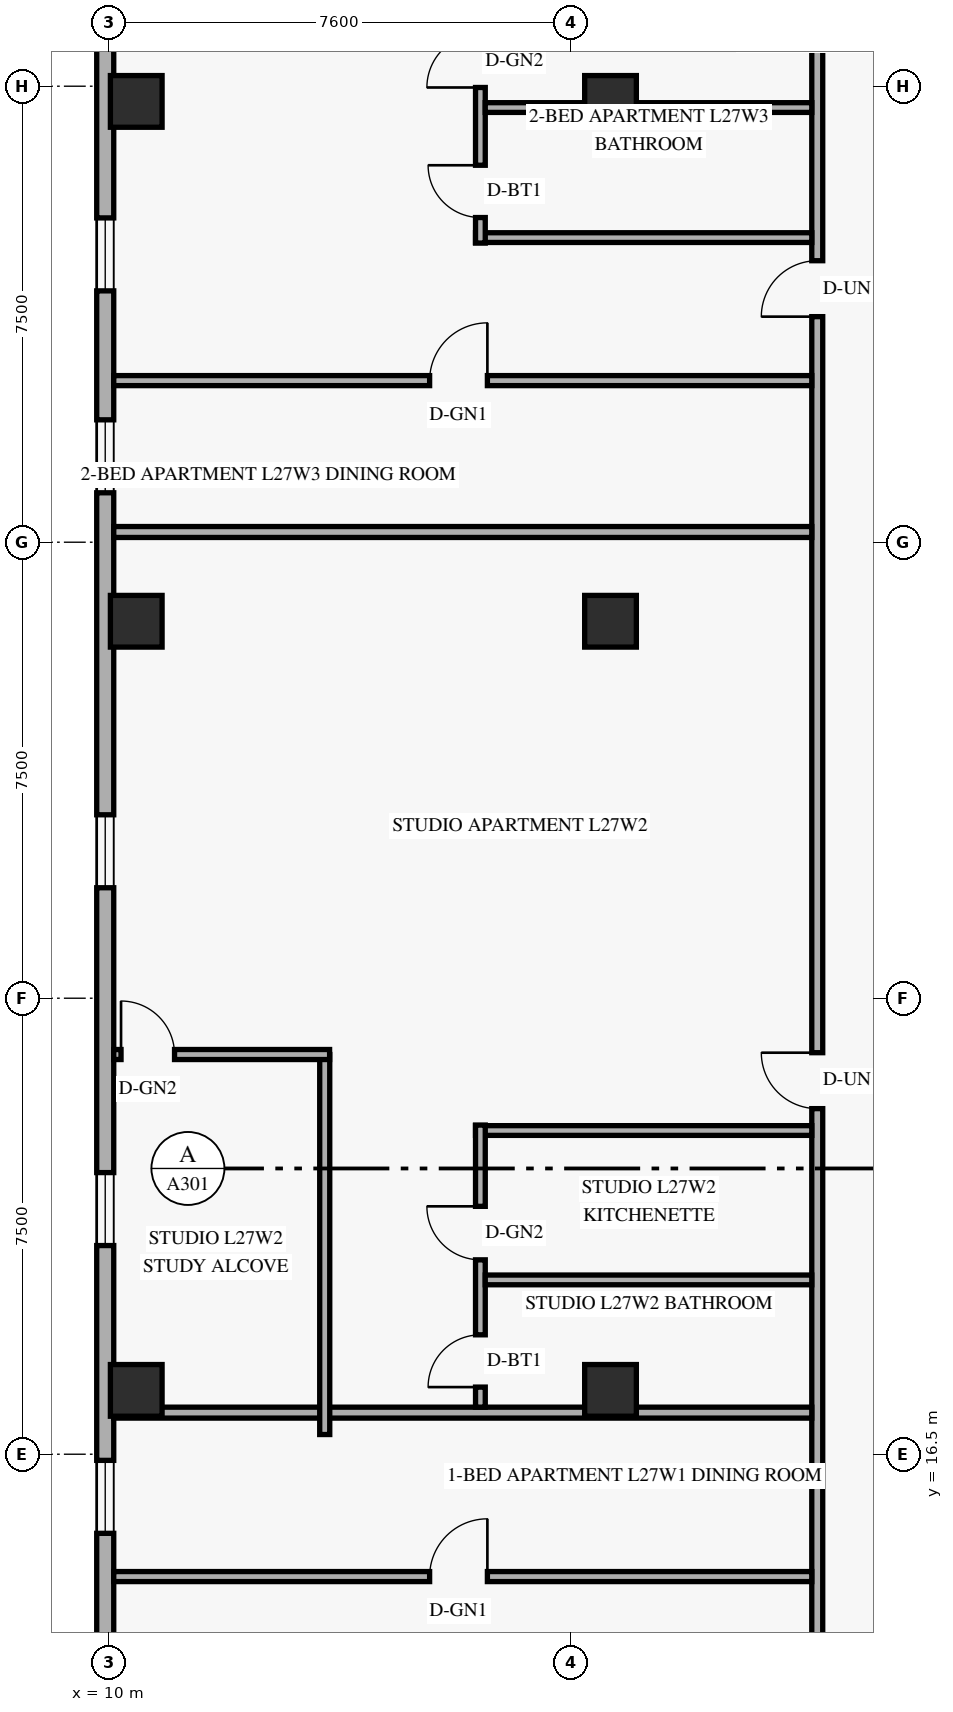
"""IFC4 building model, lengths in metres.
Left out: names, types, materials, properties, quantities, classifications, styles, units other than length and angle.
Written with IfcOpenShell. Run it as: python <this file> out.ifc"""

import sys

from ifc_helpers import new_model, si_unit, direction, frame, frame_2d, origin, origin_2d, place, context, subcontext, project, spatial, rectangle, extrude, element, fill, save


model = new_model("IFC4")
c1 = context("Model", 3, precision=1e-05, world=origin(), true_north=direction((0.0, 1.0)))
c2 = subcontext(c1, "Body", "Model", "MODEL_VIEW")
j1 = project(units=[si_unit("LENGTHUNIT", "METRE"), si_unit("PLANEANGLEUNIT", "RADIAN")], contexts=[c1])
p1 = place(None, origin())
s1 = spatial("IfcSite", under=j1, at=p1, CompositionType="ELEMENT")
p2 = place(p1, origin())
s2 = spatial("IfcBuilding", under=s1, at=p2, CompositionType="ELEMENT")
p3 = place(p2, frame((0.0, 0.0, 106.2)))
s3 = spatial("IfcBuildingStorey", under=s2, at=p3, CompositionType="ELEMENT", Elevation=106.2)
for number, where, z_axis, x_axis in (
    (1, (10.45, 17.55, 0.0), (0.0, 0.0, 1.0), (1.0, 0.0, 0.0)),
    (2, (10.45, 30.2, 0.0), (0.0, 0.0, 1.0), (1.0, 0.0, 0.0)),
    (3, (10.45, 38.75, 0.0), (0.0, 0.0, 1.0), (1.0, 0.0, 0.0)),
    (4, (18.25, 17.55, 0.0), (0.0, 0.0, 1.0), (1.0, 0.0, 0.0)),
    (5, (18.25, 30.2, 0.0), (0.0, 0.0, 1.0), (1.0, 0.0, 0.0)),
    (6, (18.25, 38.75, 0.0), (0.0, 0.0, 1.0), (1.0, 0.0, 0.0)),
):
    element("IfcColumn", number, at=place(p3, frame(where, z_axis=z_axis, x_axis=x_axis)), inside=s3, PredefinedType="COLUMN", context=c2, shape_type="SweptSolid", body=[
        extrude(rectangle(XDim=0.85, YDim=0.85, at=origin_2d()), origin(), (0.0, 0.0, 1.0), 3.6),
    ])
p4 = place(p3, frame((9.94, 41.68, 0.0), z_axis=(0.0, 0.0, 1.0), x_axis=(0.0, -1.0, 0.0)))
e7 = element("IfcWall", 7, at=p4, inside=s3, PredefinedType="SOLIDWALL", context=c2, shape_type="SweptSolid", body=[
    extrude(rectangle(XDim=35.36, YDim=0.28, at=frame_2d((17.68, 0.0))), origin(), (0.0, 0.0, 1.0), 3.36),
])
p5 = place(p4, frame((28.991, 0.0, 0.85)))
e8 = element("IfcOpeningElement", 8, at=p5, cuts=e7, PredefinedType="OPENING", context=c2, shape_type="SweptSolid", body=[
    extrude(rectangle(XDim=1.2, YDim=1.5, at=frame_2d((0.6, 0.75))), frame((0.0, 0.15, 0.0), z_axis=(0.0, -1.0, 0.0), x_axis=(1.0, 0.0, 0.0)), (0.0, 0.0, 1.0), 0.3),
])
p6 = place(p4, frame((25.281, 0.0, 0.85)))
e9 = element("IfcOpeningElement", 9, at=p6, cuts=e7, PredefinedType="OPENING", context=c2, shape_type="SweptSolid", body=[
    extrude(rectangle(XDim=1.2, YDim=1.5, at=frame_2d((0.6, 0.75))), frame((0.0, 0.15, 0.0), z_axis=(0.0, -1.0, 0.0), x_axis=(1.0, 0.0, 0.0)), (0.0, 0.0, 1.0), 0.3),
])
p7 = place(p4, frame((20.548, 0.0, 0.85)))
e10 = element("IfcOpeningElement", 10, at=p7, cuts=e7, PredefinedType="OPENING", context=c2, shape_type="SweptSolid", body=[
    extrude(rectangle(XDim=1.2, YDim=1.5, at=frame_2d((0.6, 0.75))), frame((0.0, 0.15, 0.0), z_axis=(0.0, -1.0, 0.0), x_axis=(1.0, 0.0, 0.0)), (0.0, 0.0, 1.0), 0.3),
])
p8 = place(p4, frame((14.663, 0.0, 0.85)))
e11 = element("IfcOpeningElement", 11, at=p8, cuts=e7, PredefinedType="OPENING", context=c2, shape_type="SweptSolid", body=[
    extrude(rectangle(XDim=1.2, YDim=1.5, at=frame_2d((0.6, 0.75))), frame((0.0, 0.15, 0.0), z_axis=(0.0, -1.0, 0.0), x_axis=(1.0, 0.0, 0.0)), (0.0, 0.0, 1.0), 0.3),
])
p9 = place(p4, frame((8.167, 0.0, 0.85)))
e12 = element("IfcOpeningElement", 12, at=p9, cuts=e7, PredefinedType="OPENING", context=c2, shape_type="SweptSolid", body=[
    extrude(rectangle(XDim=1.2, YDim=1.5, at=frame_2d((0.6, 0.75))), frame((0.0, 0.15, 0.0), z_axis=(0.0, -1.0, 0.0), x_axis=(1.0, 0.0, 0.0)), (0.0, 0.0, 1.0), 0.3),
])
p10 = place(p4, frame((4.846, 0.0, 0.85)))
e13 = element("IfcOpeningElement", 13, at=p10, cuts=e7, PredefinedType="OPENING", context=c2, shape_type="SweptSolid", body=[
    extrude(rectangle(XDim=1.2, YDim=1.5, at=frame_2d((0.6, 0.75))), frame((0.0, 0.15, 0.0), z_axis=(0.0, -1.0, 0.0), x_axis=(1.0, 0.0, 0.0)), (0.0, 0.0, 1.0), 0.3),
])
p11 = place(p3, frame((21.65, 6.8, 0.0), z_axis=(0.0, 0.0, 1.0), x_axis=(0.0, 1.0, 0.0)))
e14 = element("IfcWall", 14, at=p11, inside=s3, PredefinedType="STANDARD", context=c2, shape_type="SweptSolid", body=[
    extrude(rectangle(XDim=34.4, YDim=0.18, at=frame_2d((17.2, 0.0))), origin(), (0.0, 0.0, 1.0), 2.731),
])
p12 = place(p11, frame((4.785, 0.0, 0.0)))
e15 = element("IfcOpeningElement", 15, at=p12, cuts=e14, PredefinedType="OPENING", context=c2, shape_type="SweptSolid", body=[
    extrude(rectangle(XDim=0.92, YDim=2.15, at=frame_2d((0.46, 1.075))), frame((0.0, 0.1, 0.0), z_axis=(0.0, -1.0, 0.0), x_axis=(1.0, 0.0, 0.0)), (0.0, 0.0, 1.0), 0.2),
])
p13 = place(p11, frame((15.384, 0.0, 0.0)))
e16 = element("IfcOpeningElement", 16, at=p13, cuts=e14, PredefinedType="OPENING", context=c2, shape_type="SweptSolid", body=[
    extrude(rectangle(XDim=0.92, YDim=2.15, at=frame_2d((0.46, 1.075))), frame((0.0, 0.1, 0.0), z_axis=(0.0, -1.0, 0.0), x_axis=(1.0, 0.0, 0.0)), (0.0, 0.0, 1.0), 0.2),
])
p14 = place(p11, frame((28.41, 0.0, 0.0)))
e17 = element("IfcOpeningElement", 17, at=p14, cuts=e14, PredefinedType="OPENING", context=c2, shape_type="SweptSolid", body=[
    extrude(rectangle(XDim=0.92, YDim=2.15, at=frame_2d((0.46, 1.075))), frame((0.0, 0.1, 0.0), z_axis=(0.0, -1.0, 0.0), x_axis=(1.0, 0.0, 0.0)), (0.0, 0.0, 1.0), 0.2),
])
p15 = place(p3, frame((10.08, 14.488, 0.0), z_axis=(0.0, 0.0, 1.0), x_axis=(1.0, 0.0, 0.0)))
e18 = element("IfcWall", 18, at=p15, inside=s3, PredefinedType="PARTITIONING", context=c2, shape_type="SweptSolid", body=[
    extrude(rectangle(XDim=11.48, YDim=0.165, at=frame_2d((5.74, 0.0))), origin(), (0.0, 0.0, 1.0), 2.731),
])
p16 = place(p15, frame((5.195, 0.0, 0.0)))
e19 = element("IfcOpeningElement", 19, at=p16, cuts=e18, PredefinedType="OPENING", context=c2, shape_type="SweptSolid", body=[
    extrude(rectangle(XDim=0.95, YDim=2.15, at=frame_2d((0.475, 1.075))), frame((0.0, 0.093, 0.0), z_axis=(0.0, -1.0, 0.0), x_axis=(1.0, 0.0, 0.0)), (0.0, 0.0, 1.0), 0.185),
])
p17 = place(p3, frame((10.08, 17.184, 0.0), z_axis=(0.0, 0.0, 1.0), x_axis=(1.0, 0.0, 0.0)))
e20 = element("IfcWall", 20, at=p17, inside=s3, PredefinedType="PARTITIONING", context=c2, shape_type="SweptSolid", body=[
    extrude(rectangle(XDim=11.48, YDim=0.18, at=frame_2d((5.74, 0.0))), origin(), (0.0, 0.0, 1.0), 2.731),
])
p18 = place(p3, frame((16.03, 21.824, 0.0), z_axis=(0.0, 0.0, 1.0), x_axis=(1.0, 0.0, 0.0)))
e21 = element("IfcWall", 21, at=p18, inside=s3, PredefinedType="PLUMBINGWALL", context=c2, shape_type="SweptSolid", body=[
    extrude(rectangle(XDim=5.53, YDim=0.16, at=frame_2d((2.765, 0.0))), origin(), (0.0, 0.0, 1.0), 2.731),
])
p19 = place(p3, frame((16.11, 17.274, 0.0), z_axis=(0.0, 0.0, 1.0), x_axis=(0.0, 1.0, 0.0)))
e22 = element("IfcWall", 22, at=p19, inside=s3, PredefinedType="PLUMBINGWALL", context=c2, shape_type="SweptSolid", body=[
    extrude(rectangle(XDim=4.64, YDim=0.16, at=frame_2d((2.32, 0.0))), origin(), (0.0, 0.0, 1.0), 2.731),
])
p20 = place(p19, frame((0.33, 0.0, 0.0)))
e23 = element("IfcOpeningElement", 23, at=p20, cuts=e22, PredefinedType="OPENING", context=c2, shape_type="SweptSolid", body=[
    extrude(rectangle(XDim=0.86, YDim=2.12, at=frame_2d((0.43, 1.06))), frame((0.0, 0.09, 0.0), z_axis=(0.0, -1.0, 0.0), x_axis=(1.0, 0.0, 0.0)), (0.0, 0.0, 1.0), 0.18),
])
p21 = place(p19, frame((2.423, 0.0, 0.0)))
e24 = element("IfcOpeningElement", 24, at=p21, cuts=e22, PredefinedType="OPENING", context=c2, shape_type="SweptSolid", body=[
    extrude(rectangle(XDim=0.88, YDim=2.12, at=frame_2d((0.44, 1.06))), frame((0.0, 0.09, 0.0), z_axis=(0.0, -1.0, 0.0), x_axis=(1.0, 0.0, 0.0)), (0.0, 0.0, 1.0), 0.18),
])
p22 = place(p3, frame((16.19, 19.367, 0.0), z_axis=(0.0, 0.0, 1.0), x_axis=(1.0, 0.0, 0.0)))
e25 = element("IfcWall", 25, at=p22, inside=s3, PredefinedType="PLUMBINGWALL", context=c2, shape_type="SweptSolid", body=[
    extrude(rectangle(XDim=5.37, YDim=0.16, at=frame_2d((2.685, 0.0))), origin(), (0.0, 0.0, 1.0), 2.731),
])
p23 = place(p3, frame((13.55, 16.824, 0.0), z_axis=(0.0, 0.0, 1.0), x_axis=(0.0, 1.0, 0.0)))
e26 = element("IfcWall", 26, at=p23, inside=s3, PredefinedType="PARTITIONING", context=c2, shape_type="SweptSolid", body=[
    extrude(rectangle(XDim=6.25, YDim=0.165, at=frame_2d((3.125, 0.0))), origin(), (0.0, 0.0, 1.0), 2.731),
])
p24 = place(p3, frame((10.08, 23.074, 0.0), z_axis=(0.0, 0.0, 1.0), x_axis=(1.0, 0.0, 0.0)))
e27 = element("IfcWall", 27, at=p24, inside=s3, PredefinedType="PARTITIONING", context=c2, shape_type="SweptSolid", body=[
    extrude(rectangle(XDim=3.55, YDim=0.165, at=frame_2d((1.775, 0.0))), origin(), (0.0, 0.0, 1.0), 2.809),
])
p25 = place(p24, frame((0.12, 0.0, 0.0)))
e28 = element("IfcOpeningElement", 28, at=p25, cuts=e27, PredefinedType="OPENING", context=c2, shape_type="SweptSolid", body=[
    extrude(rectangle(XDim=0.88, YDim=2.12, at=frame_2d((0.44, 1.06))), frame((0.0, 0.093, 0.0), z_axis=(0.0, -1.0, 0.0), x_axis=(1.0, 0.0, 0.0)), (0.0, 0.0, 1.0), 0.185),
])
p26 = place(p3, frame((10.08, 31.668, 0.0), z_axis=(0.0, 0.0, 1.0), x_axis=(1.0, 0.0, 0.0)))
e29 = element("IfcWall", 29, at=p26, inside=s3, PredefinedType="PARTITIONING", context=c2, shape_type="SweptSolid", body=[
    extrude(rectangle(XDim=11.48, YDim=0.18, at=frame_2d((5.74, 0.0))), origin(), (0.0, 0.0, 1.0), 2.731),
])
p27 = place(p3, frame((16.03, 36.51, 0.0), z_axis=(0.0, 0.0, 1.0), x_axis=(1.0, 0.0, 0.0)))
e30 = element("IfcWall", 30, at=p27, inside=s3, PredefinedType="PLUMBINGWALL", context=c2, shape_type="SweptSolid", body=[
    extrude(rectangle(XDim=5.53, YDim=0.16, at=frame_2d((2.765, 0.0))), origin(), (0.0, 0.0, 1.0), 2.731),
])
p28 = place(p3, frame((16.11, 36.42, 0.0), z_axis=(0.0, 0.0, 1.0), x_axis=(0.0, 1.0, 0.0)))
e31 = element("IfcWall", 31, at=p28, inside=s3, PredefinedType="PLUMBINGWALL", context=c2, shape_type="SweptSolid", body=[
    extrude(rectangle(XDim=4.83, YDim=0.16, at=frame_2d((2.415, 0.0))), origin(), (0.0, 0.0, 1.0), 2.731),
])
p29 = place(p28, frame((0.42, 0.0, 0.0)))
e32 = element("IfcOpeningElement", 32, at=p29, cuts=e31, PredefinedType="OPENING", context=c2, shape_type="SweptSolid", body=[
    extrude(rectangle(XDim=0.86, YDim=2.12, at=frame_2d((0.43, 1.06))), frame((0.0, 0.09, 0.0), z_axis=(0.0, -1.0, 0.0), x_axis=(1.0, 0.0, 0.0)), (0.0, 0.0, 1.0), 0.18),
])
p30 = place(p28, frame((2.559, 0.0, 0.0)))
e33 = element("IfcOpeningElement", 33, at=p30, cuts=e31, PredefinedType="OPENING", context=c2, shape_type="SweptSolid", body=[
    extrude(rectangle(XDim=0.88, YDim=2.12, at=frame_2d((0.44, 1.06))), frame((0.0, 0.09, 0.0), z_axis=(0.0, -1.0, 0.0), x_axis=(1.0, 0.0, 0.0)), (0.0, 0.0, 1.0), 0.18),
])
p31 = place(p3, frame((16.19, 38.649, 0.0), z_axis=(0.0, 0.0, 1.0), x_axis=(1.0, 0.0, 0.0)))
e34 = element("IfcWall", 34, at=p31, inside=s3, PredefinedType="PLUMBINGWALL", context=c2, shape_type="SweptSolid", body=[
    extrude(rectangle(XDim=5.37, YDim=0.16, at=frame_2d((2.685, 0.0))), origin(), (0.0, 0.0, 1.0), 2.731),
])
p32 = place(p3, frame((10.08, 34.158, 0.0), z_axis=(0.0, 0.0, 1.0), x_axis=(1.0, 0.0, 0.0)))
e35 = element("IfcWall", 35, at=p32, inside=s3, PredefinedType="PARTITIONING", context=c2, shape_type="SweptSolid", body=[
    extrude(rectangle(XDim=11.48, YDim=0.165, at=frame_2d((5.74, 0.0))), origin(), (0.0, 0.0, 1.0), 2.731),
])
p33 = place(p32, frame((5.195, 0.0, 0.0)))
e36 = element("IfcOpeningElement", 36, at=p33, cuts=e35, PredefinedType="OPENING", context=c2, shape_type="SweptSolid", body=[
    extrude(rectangle(XDim=0.95, YDim=2.15, at=frame_2d((0.475, 1.075))), frame((0.0, 0.093, 0.0), z_axis=(0.0, -1.0, 0.0), x_axis=(1.0, 0.0, 0.0)), (0.0, 0.0, 1.0), 0.185),
])
p34 = place(p6, origin())
e37 = element("IfcWindow", 37, at=p34, inside=s3, PartitioningType="SINGLE_PANEL", PredefinedType="WINDOW", context=c2, shape_type="SweptSolid", body=[
    extrude(rectangle(XDim=1.2, YDim=1.5, at=frame_2d((0.6, 0.75))), frame((0.0, 0.03, 0.0), z_axis=(0.0, -1.0, 0.0), x_axis=(1.0, 0.0, 0.0)), (0.0, 0.0, 1.0), 0.06),
])
fill(e9, e37)
p35 = place(p7, origin())
e38 = element("IfcWindow", 38, at=p35, inside=s3, PartitioningType="SINGLE_PANEL", PredefinedType="WINDOW", context=c2, shape_type="SweptSolid", body=[
    extrude(rectangle(XDim=1.2, YDim=1.5, at=frame_2d((0.6, 0.75))), frame((0.0, 0.03, 0.0), z_axis=(0.0, -1.0, 0.0), x_axis=(1.0, 0.0, 0.0)), (0.0, 0.0, 1.0), 0.06),
])
fill(e10, e38)
p36 = place(p8, origin())
e39 = element("IfcWindow", 39, at=p36, inside=s3, PartitioningType="SINGLE_PANEL", PredefinedType="WINDOW", context=c2, shape_type="SweptSolid", body=[
    extrude(rectangle(XDim=1.2, YDim=1.5, at=frame_2d((0.6, 0.75))), frame((0.0, 0.03, 0.0), z_axis=(0.0, -1.0, 0.0), x_axis=(1.0, 0.0, 0.0)), (0.0, 0.0, 1.0), 0.06),
])
fill(e11, e39)
p37 = place(p9, origin())
e40 = element("IfcWindow", 40, at=p37, inside=s3, PartitioningType="SINGLE_PANEL", PredefinedType="WINDOW", context=c2, shape_type="SweptSolid", body=[
    extrude(rectangle(XDim=1.2, YDim=1.5, at=frame_2d((0.6, 0.75))), frame((0.0, 0.03, 0.0), z_axis=(0.0, -1.0, 0.0), x_axis=(1.0, 0.0, 0.0)), (0.0, 0.0, 1.0), 0.06),
])
fill(e12, e40)
p38 = place(p10, origin())
e41 = element("IfcWindow", 41, at=p38, inside=s3, PartitioningType="SINGLE_PANEL", PredefinedType="WINDOW", context=c2, shape_type="SweptSolid", body=[
    extrude(rectangle(XDim=1.2, YDim=1.5, at=frame_2d((0.6, 0.75))), frame((0.0, 0.03, 0.0), z_axis=(0.0, -1.0, 0.0), x_axis=(1.0, 0.0, 0.0)), (0.0, 0.0, 1.0), 0.06),
])
fill(e13, e41)
p39 = place(p16, origin())
e42 = element("IfcDoor", 42, at=p39, inside=s3, OperationType="SINGLE_SWING_RIGHT", PredefinedType="DOOR", context=c2, shape_type="SweptSolid", body=[
    extrude(rectangle(XDim=0.95, YDim=2.15, at=frame_2d((0.475, 1.075))), frame((0.0, 0.025, 0.0), z_axis=(0.0, -1.0, 0.0), x_axis=(1.0, 0.0, 0.0)), (0.0, 0.0, 1.0), 0.05),
])
fill(e19, e42)
p40 = place(p25, origin())
e43 = element("IfcDoor", 43, at=p40, inside=s3, OperationType="SINGLE_SWING_LEFT", PredefinedType="DOOR", context=c2, shape_type="SweptSolid", body=[
    extrude(rectangle(XDim=0.88, YDim=2.12, at=frame_2d((0.44, 1.06))), frame((0.0, 0.025, 0.0), z_axis=(0.0, -1.0, 0.0), x_axis=(1.0, 0.0, 0.0)), (0.0, 0.0, 1.0), 0.05),
])
fill(e28, e43)
p41 = place(p13, origin())
e44 = element("IfcDoor", 44, at=p41, inside=s3, OperationType="SINGLE_SWING_RIGHT", PredefinedType="DOOR", context=c2, shape_type="SweptSolid", body=[
    extrude(rectangle(XDim=0.92, YDim=2.15, at=frame_2d((0.46, 1.075))), frame((0.0, 0.025, 0.0), z_axis=(0.0, -1.0, 0.0), x_axis=(1.0, 0.0, 0.0)), (0.0, 0.0, 1.0), 0.05),
])
fill(e16, e44)
p42 = place(p20, origin())
e45 = element("IfcDoor", 45, at=p42, inside=s3, OperationType="SINGLE_SWING_LEFT", PredefinedType="DOOR", context=c2, shape_type="SweptSolid", body=[
    extrude(rectangle(XDim=0.86, YDim=2.12, at=frame_2d((0.43, 1.06))), frame((0.0, 0.025, 0.0), z_axis=(0.0, -1.0, 0.0), x_axis=(1.0, 0.0, 0.0)), (0.0, 0.0, 1.0), 0.05),
])
fill(e23, e45)
p43 = place(p21, origin())
e46 = element("IfcDoor", 46, at=p43, inside=s3, OperationType="SINGLE_SWING_RIGHT", PredefinedType="DOOR", context=c2, shape_type="SweptSolid", body=[
    extrude(rectangle(XDim=0.88, YDim=2.12, at=frame_2d((0.44, 1.06))), frame((0.0, 0.025, 0.0), z_axis=(0.0, -1.0, 0.0), x_axis=(1.0, 0.0, 0.0)), (0.0, 0.0, 1.0), 0.05),
])
fill(e24, e46)
p44 = place(p33, origin())
e47 = element("IfcDoor", 47, at=p44, inside=s3, OperationType="SINGLE_SWING_RIGHT", PredefinedType="DOOR", context=c2, shape_type="SweptSolid", body=[
    extrude(rectangle(XDim=0.95, YDim=2.15, at=frame_2d((0.475, 1.075))), frame((0.0, 0.025, 0.0), z_axis=(0.0, -1.0, 0.0), x_axis=(1.0, 0.0, 0.0)), (0.0, 0.0, 1.0), 0.05),
])
fill(e36, e47)
p45 = place(p14, origin())
e48 = element("IfcDoor", 48, at=p45, inside=s3, OperationType="SINGLE_SWING_LEFT", PredefinedType="DOOR", context=c2, shape_type="SweptSolid", body=[
    extrude(rectangle(XDim=0.92, YDim=2.15, at=frame_2d((0.46, 1.075))), frame((0.0, 0.025, 0.0), z_axis=(0.0, -1.0, 0.0), x_axis=(1.0, 0.0, 0.0)), (0.0, 0.0, 1.0), 0.05),
])
fill(e17, e48)
p46 = place(p29, origin())
e49 = element("IfcDoor", 49, at=p46, inside=s3, OperationType="SINGLE_SWING_RIGHT", PredefinedType="DOOR", context=c2, shape_type="SweptSolid", body=[
    extrude(rectangle(XDim=0.86, YDim=2.12, at=frame_2d((0.43, 1.06))), frame((0.0, 0.025, 0.0), z_axis=(0.0, -1.0, 0.0), x_axis=(1.0, 0.0, 0.0)), (0.0, 0.0, 1.0), 0.05),
])
fill(e32, e49)
p47 = place(p30, origin())
e50 = element("IfcDoor", 50, at=p47, inside=s3, OperationType="SINGLE_SWING_LEFT", PredefinedType="DOOR", context=c2, shape_type="SweptSolid", body=[
    extrude(rectangle(XDim=0.88, YDim=2.12, at=frame_2d((0.44, 1.06))), frame((0.0, 0.025, 0.0), z_axis=(0.0, -1.0, 0.0), x_axis=(1.0, 0.0, 0.0)), (0.0, 0.0, 1.0), 0.05),
])
fill(e33, e50)
save(model, sys.argv[1])
